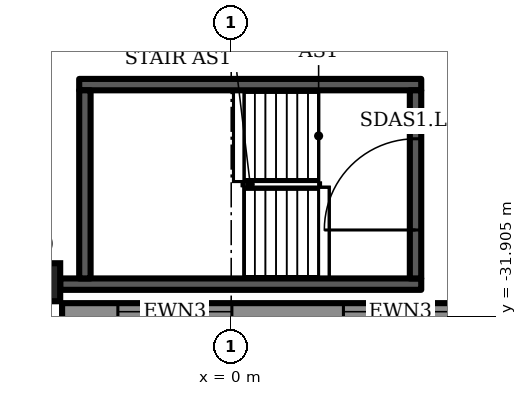
"""IFC4 building model, lengths in metres.
Left out: names, types, materials, properties, quantities, classifications, styles, units other than length and angle.
Written with IfcOpenShell. Run it as: python <this file> out.ifc"""

import sys

from ifc_helpers import new_model, si_unit, direction, frame, frame_2d, origin, origin_2d, place, context, subcontext, project, spatial, rectangle, extrude, element, fill, save


model = new_model("IFC4")
c1 = context("Model", 3, precision=1e-05, world=origin(), true_north=direction((0.0, 1.0)))
c2 = subcontext(c1, "Body", "Model", "MODEL_VIEW")
j1 = project(units=[si_unit("LENGTHUNIT", "METRE"), si_unit("PLANEANGLEUNIT", "RADIAN")], contexts=[c1])
p1 = place(None, origin())
s1 = spatial("IfcSite", under=j1, at=p1, CompositionType="ELEMENT")
p2 = place(p1, origin())
s2 = spatial("IfcBuilding", under=s1, at=p2, CompositionType="ELEMENT")
p3 = place(p2, frame((0.0, 0.0, 21.5)))
s3 = spatial("IfcBuildingStorey", under=s2, at=p3, CompositionType="ELEMENT", Elevation=21.5)
p4 = place(p3, frame((-5.0, -31.0, 0.0), z_axis=(0.0, 0.0, 1.0), x_axis=(1.0, 0.0, 0.0)))
e1 = element("IfcColumn", 1, at=p4, inside=s3, PredefinedType="COLUMN", context=c2, shape_type="SweptSolid", body=[
    extrude(rectangle(XDim=1.0, YDim=1.0, at=origin_2d()), origin(), (0.0, 0.0, 1.0), 6.0),
])
p5 = place(p3, frame((-4.45, -31.775, 0.0), z_axis=(0.0, 0.0, 1.0), x_axis=(1.0, 0.0, 0.0)))
e2 = element("IfcWall", 2, at=p5, inside=s3, PredefinedType="SOLIDWALL", context=c2, shape_type="SweptSolid", body=[
    extrude(rectangle(XDim=100.9, YDim=0.45, at=frame_2d((50.45, 0.0))), origin(), (0.0, 0.0, 1.0), 5.7),
])
p6 = place(p5, frame((1.468, 0.0, 1.0)))
e3 = element("IfcOpeningElement", 3, at=p6, cuts=e2, PredefinedType="OPENING", context=c2, shape_type="SweptSolid", body=[
    extrude(rectangle(XDim=3.0, YDim=3.7, at=frame_2d((1.5, 1.85))), frame((0.0, 0.235, 0.0), z_axis=(0.0, -1.0, 0.0), x_axis=(1.0, 0.0, 0.0)), (0.0, 0.0, 1.0), 0.47),
])
p7 = place(p5, frame((7.403, 0.0, 1.0)))
e4 = element("IfcOpeningElement", 4, at=p7, cuts=e2, PredefinedType="OPENING", context=c2, shape_type="SweptSolid", body=[
    extrude(rectangle(XDim=3.0, YDim=3.7, at=frame_2d((1.5, 1.85))), frame((0.0, 0.235, 0.0), z_axis=(0.0, -1.0, 0.0), x_axis=(1.0, 0.0, 0.0)), (0.0, 0.0, 1.0), 0.47),
])
p8 = place(p5, frame((13.338, 0.0, 1.0)))
e5 = element("IfcOpeningElement", 5, at=p8, cuts=e2, PredefinedType="OPENING", context=c2, shape_type="SweptSolid", body=[
    extrude(rectangle(XDim=3.0, YDim=3.7, at=frame_2d((1.5, 1.85))), frame((0.0, 0.235, 0.0), z_axis=(0.0, -1.0, 0.0), x_axis=(1.0, 0.0, 0.0)), (0.0, 0.0, 1.0), 0.47),
])
p9 = place(p5, frame((19.273, 0.0, 1.0)))
e6 = element("IfcOpeningElement", 6, at=p9, cuts=e2, PredefinedType="OPENING", context=c2, shape_type="SweptSolid", body=[
    extrude(rectangle(XDim=3.0, YDim=3.7, at=frame_2d((1.5, 1.85))), frame((0.0, 0.235, 0.0), z_axis=(0.0, -1.0, 0.0), x_axis=(1.0, 0.0, 0.0)), (0.0, 0.0, 1.0), 0.47),
])
p10 = place(p5, frame((25.209, 0.0, 1.0)))
e7 = element("IfcOpeningElement", 7, at=p10, cuts=e2, PredefinedType="OPENING", context=c2, shape_type="SweptSolid", body=[
    extrude(rectangle(XDim=3.0, YDim=3.7, at=frame_2d((1.5, 1.85))), frame((0.0, 0.235, 0.0), z_axis=(0.0, -1.0, 0.0), x_axis=(1.0, 0.0, 0.0)), (0.0, 0.0, 1.0), 0.47),
])
p11 = place(p5, frame((31.144, 0.0, 1.0)))
e8 = element("IfcOpeningElement", 8, at=p11, cuts=e2, PredefinedType="OPENING", context=c2, shape_type="SweptSolid", body=[
    extrude(rectangle(XDim=3.0, YDim=3.7, at=frame_2d((1.5, 1.85))), frame((0.0, 0.235, 0.0), z_axis=(0.0, -1.0, 0.0), x_axis=(1.0, 0.0, 0.0)), (0.0, 0.0, 1.0), 0.47),
])
p12 = place(p5, frame((37.079, 0.0, 1.0)))
e9 = element("IfcOpeningElement", 9, at=p12, cuts=e2, PredefinedType="OPENING", context=c2, shape_type="SweptSolid", body=[
    extrude(rectangle(XDim=3.0, YDim=3.7, at=frame_2d((1.5, 1.85))), frame((0.0, 0.235, 0.0), z_axis=(0.0, -1.0, 0.0), x_axis=(1.0, 0.0, 0.0)), (0.0, 0.0, 1.0), 0.47),
])
p13 = place(p5, frame((43.015, 0.0, 1.0)))
e10 = element("IfcOpeningElement", 10, at=p13, cuts=e2, PredefinedType="OPENING", context=c2, shape_type="SweptSolid", body=[
    extrude(rectangle(XDim=3.0, YDim=3.7, at=frame_2d((1.5, 1.85))), frame((0.0, 0.235, 0.0), z_axis=(0.0, -1.0, 0.0), x_axis=(1.0, 0.0, 0.0)), (0.0, 0.0, 1.0), 0.47),
])
p14 = place(p5, frame((48.95, 0.0, 1.0)))
e11 = element("IfcOpeningElement", 11, at=p14, cuts=e2, PredefinedType="OPENING", context=c2, shape_type="SweptSolid", body=[
    extrude(rectangle(XDim=3.0, YDim=3.7, at=frame_2d((1.5, 1.85))), frame((0.0, 0.235, 0.0), z_axis=(0.0, -1.0, 0.0), x_axis=(1.0, 0.0, 0.0)), (0.0, 0.0, 1.0), 0.47),
])
p15 = place(p5, frame((54.885, 0.0, 1.0)))
e12 = element("IfcOpeningElement", 12, at=p15, cuts=e2, PredefinedType="OPENING", context=c2, shape_type="SweptSolid", body=[
    extrude(rectangle(XDim=3.0, YDim=3.7, at=frame_2d((1.5, 1.85))), frame((0.0, 0.235, 0.0), z_axis=(0.0, -1.0, 0.0), x_axis=(1.0, 0.0, 0.0)), (0.0, 0.0, 1.0), 0.47),
])
p16 = place(p5, frame((60.821, 0.0, 1.0)))
e13 = element("IfcOpeningElement", 13, at=p16, cuts=e2, PredefinedType="OPENING", context=c2, shape_type="SweptSolid", body=[
    extrude(rectangle(XDim=3.0, YDim=3.7, at=frame_2d((1.5, 1.85))), frame((0.0, 0.235, 0.0), z_axis=(0.0, -1.0, 0.0), x_axis=(1.0, 0.0, 0.0)), (0.0, 0.0, 1.0), 0.47),
])
p17 = place(p5, frame((66.756, 0.0, 1.0)))
e14 = element("IfcOpeningElement", 14, at=p17, cuts=e2, PredefinedType="OPENING", context=c2, shape_type="SweptSolid", body=[
    extrude(rectangle(XDim=3.0, YDim=3.7, at=frame_2d((1.5, 1.85))), frame((0.0, 0.235, 0.0), z_axis=(0.0, -1.0, 0.0), x_axis=(1.0, 0.0, 0.0)), (0.0, 0.0, 1.0), 0.47),
])
p18 = place(p5, frame((72.691, 0.0, 1.0)))
e15 = element("IfcOpeningElement", 15, at=p18, cuts=e2, PredefinedType="OPENING", context=c2, shape_type="SweptSolid", body=[
    extrude(rectangle(XDim=3.0, YDim=3.7, at=frame_2d((1.5, 1.85))), frame((0.0, 0.235, 0.0), z_axis=(0.0, -1.0, 0.0), x_axis=(1.0, 0.0, 0.0)), (0.0, 0.0, 1.0), 0.47),
])
p19 = place(p5, frame((78.626, 0.0, 1.0)))
e16 = element("IfcOpeningElement", 16, at=p19, cuts=e2, PredefinedType="OPENING", context=c2, shape_type="SweptSolid", body=[
    extrude(rectangle(XDim=3.0, YDim=3.7, at=frame_2d((1.5, 1.85))), frame((0.0, 0.235, 0.0), z_axis=(0.0, -1.0, 0.0), x_axis=(1.0, 0.0, 0.0)), (0.0, 0.0, 1.0), 0.47),
])
p20 = place(p5, frame((84.562, 0.0, 1.0)))
e17 = element("IfcOpeningElement", 17, at=p20, cuts=e2, PredefinedType="OPENING", context=c2, shape_type="SweptSolid", body=[
    extrude(rectangle(XDim=3.0, YDim=3.7, at=frame_2d((1.5, 1.85))), frame((0.0, 0.235, 0.0), z_axis=(0.0, -1.0, 0.0), x_axis=(1.0, 0.0, 0.0)), (0.0, 0.0, 1.0), 0.47),
])
p21 = place(p5, frame((90.497, 0.0, 1.0)))
e18 = element("IfcOpeningElement", 18, at=p21, cuts=e2, PredefinedType="OPENING", context=c2, shape_type="SweptSolid", body=[
    extrude(rectangle(XDim=3.0, YDim=3.7, at=frame_2d((1.5, 1.85))), frame((0.0, 0.235, 0.0), z_axis=(0.0, -1.0, 0.0), x_axis=(1.0, 0.0, 0.0)), (0.0, 0.0, 1.0), 0.47),
])
p22 = place(p5, frame((96.432, 0.0, 1.0)))
e19 = element("IfcOpeningElement", 19, at=p22, cuts=e2, PredefinedType="OPENING", context=c2, shape_type="SweptSolid", body=[
    extrude(rectangle(XDim=3.0, YDim=3.7, at=frame_2d((1.5, 1.85))), frame((0.0, 0.235, 0.0), z_axis=(0.0, -1.0, 0.0), x_axis=(1.0, 0.0, 0.0)), (0.0, 0.0, 1.0), 0.47),
])
p23 = place(p3, frame((-4.5, -31.05, 0.0), z_axis=(0.0, 0.0, 1.0), x_axis=(1.0, 0.0, 0.0)))
e20 = element("IfcWall", 20, at=p23, inside=s3, PredefinedType="SHEAR", context=c2, shape_type="SweptSolid", body=[
    extrude(rectangle(XDim=9.5, YDim=0.3, at=frame_2d((4.75, 0.0))), origin(), (0.0, 0.0, 1.0), 5.7),
])
p24 = place(p3, frame((-4.0, -25.8, 0.0), z_axis=(0.0, 0.0, 1.0), x_axis=(1.0, 0.0, 0.0)))
e21 = element("IfcWall", 21, at=p24, inside=s3, PredefinedType="SHEAR", context=c2, shape_type="SweptSolid", body=[
    extrude(rectangle(XDim=9.0, YDim=0.3, at=frame_2d((4.5, 0.0))), origin(), (0.0, 0.0, 1.0), 5.7),
])
p25 = place(p3, frame((-3.85, -30.9, 0.0), z_axis=(0.0, 0.0, 1.0), x_axis=(0.0, 1.0, 0.0)))
e22 = element("IfcWall", 22, at=p25, inside=s3, PredefinedType="SHEAR", context=c2, shape_type="SweptSolid", body=[
    extrude(rectangle(XDim=4.95, YDim=0.3, at=frame_2d((2.475, 0.0))), origin(), (0.0, 0.0, 1.0), 5.7),
])
p26 = place(p3, frame((4.85, -30.9, 0.0), z_axis=(0.0, 0.0, 1.0), x_axis=(0.0, 1.0, 0.0)))
e23 = element("IfcWall", 23, at=p26, inside=s3, PredefinedType="SHEAR", context=c2, shape_type="SweptSolid", body=[
    extrude(rectangle(XDim=4.95, YDim=0.3, at=frame_2d((2.475, 0.0))), origin(), (0.0, 0.0, 1.0), 5.7),
])
p27 = place(p26, frame((1.275, 0.0, 0.0)))
e24 = element("IfcOpeningElement", 24, at=p27, cuts=e23, PredefinedType="OPENING", context=c2, shape_type="SweptSolid", body=[
    extrude(rectangle(XDim=2.4, YDim=2.1, at=frame_2d((1.2, 1.05))), frame((0.0, 0.16, 0.0), z_axis=(0.0, -1.0, 0.0), x_axis=(1.0, 0.0, 0.0)), (0.0, 0.0, 1.0), 0.32),
])
p28 = place(p6, origin())
e25 = element("IfcWindow", 25, at=p28, inside=s3, PartitioningType="SINGLE_PANEL", PredefinedType="WINDOW", context=c2, shape_type="SweptSolid", body=[
    extrude(rectangle(XDim=3.0, YDim=3.7, at=frame_2d((1.5, 1.85))), frame((0.0, 0.105, 0.0), z_axis=(0.0, -1.0, 0.0), x_axis=(1.0, 0.0, 0.0)), (0.0, 0.0, 1.0), 0.06),
])
fill(e3, e25)
p29 = place(p7, origin())
e26 = element("IfcWindow", 26, at=p29, inside=s3, PartitioningType="SINGLE_PANEL", PredefinedType="WINDOW", context=c2, shape_type="SweptSolid", body=[
    extrude(rectangle(XDim=3.0, YDim=3.7, at=frame_2d((1.5, 1.85))), frame((0.0, 0.105, 0.0), z_axis=(0.0, -1.0, 0.0), x_axis=(1.0, 0.0, 0.0)), (0.0, 0.0, 1.0), 0.06),
])
fill(e4, e26)
p30 = place(p27, origin())
e27 = element("IfcDoor", 27, at=p30, inside=s3, OperationType="DOUBLE_DOOR_SINGLE_SWING", PredefinedType="DOOR", context=c2, shape_type="SweptSolid", body=[
    extrude(rectangle(XDim=2.4, YDim=2.1, at=frame_2d((1.2, 1.05))), frame((0.0, 0.025, 0.0), z_axis=(0.0, -1.0, 0.0), x_axis=(1.0, 0.0, 0.0)), (0.0, 0.0, 1.0), 0.05),
])
fill(e24, e27)
save(model, sys.argv[1])
